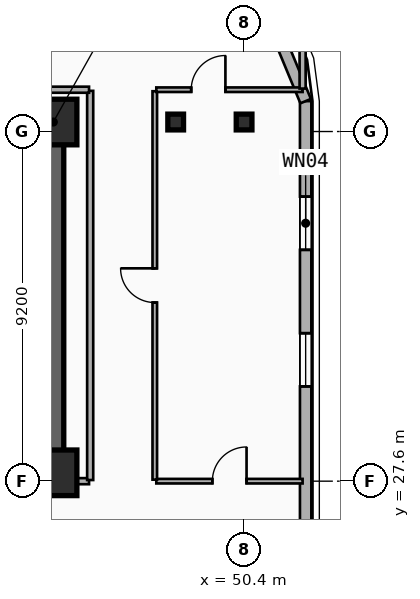
"""IFC4 building model, lengths in metres.
Left out: names, types, materials, properties, quantities, classifications, styles, units other than length and angle.
Written with IfcOpenShell. Run it as: python <this file> out.ifc"""

import sys

from ifc_helpers import new_model, si_unit, direction, frame, frame_2d, origin, origin_2d, place, context, subcontext, project, spatial, rectangle, i_section, extrude, element, fill, save


model = new_model("IFC4")
c1 = context("Model", 3, precision=1e-05, world=origin(), true_north=direction((0.0, 1.0)))
c2 = subcontext(c1, "Body", "Model", "MODEL_VIEW")
j1 = project(units=[si_unit("LENGTHUNIT", "METRE"), si_unit("PLANEANGLEUNIT", "RADIAN")], contexts=[c1])
p1 = place(None, origin())
s1 = spatial("IfcSite", under=j1, at=p1, CompositionType="ELEMENT")
p2 = place(p1, origin())
s2 = spatial("IfcBuilding", under=s1, at=p2, CompositionType="ELEMENT")
p3 = place(p2, frame((0.0, 0.0, 148.35)))
s3 = spatial("IfcBuildingStorey", under=s2, at=p3, CompositionType="ELEMENT", Elevation=148.35)
p4 = place(p3, frame((12.15, 37.05, 0.0), z_axis=(0.0, 0.0, 1.0), x_axis=(1.0, 0.0, 0.0)))
e1 = element("IfcWall", 1, at=p4, inside=s3, PredefinedType="SHEAR", context=c2, shape_type="SweptSolid", body=[
    extrude(rectangle(XDim=33.23, YDim=0.55, at=frame_2d((16.615, 0.0))), origin(), (0.0, 0.0, 1.0), 3.55),
])
p5 = place(p3, frame((45.38, 27.82, 0.0), z_axis=(0.0, 0.0, 1.0), x_axis=(-1.0, 0.0, 0.0)))
e2 = element("IfcWall", 2, at=p5, inside=s3, PredefinedType="SHEAR", context=c2, shape_type="SweptSolid", body=[
    extrude(rectangle(XDim=12.23, YDim=0.55, at=frame_2d((6.115, 0.0))), origin(), (0.0, 0.0, 1.0), 3.55),
])
p6 = place(p5, frame((9.93, 0.0, 0.0)))
e3 = element("IfcOpeningElement", 3, at=p6, cuts=e2, PredefinedType="OPENING", context=c2, shape_type="SweptSolid", body=[
    extrude(rectangle(XDim=1.1, YDim=2.15, at=frame_2d((0.55, 1.075))), frame((0.0, 0.285, 0.0), z_axis=(0.0, -1.0, 0.0), x_axis=(1.0, 0.0, 0.0)), (0.0, 0.0, 1.0), 0.57),
])
p7 = place(p5, frame((6.23, 0.0, 0.0)))
e4 = element("IfcOpeningElement", 4, at=p7, cuts=e2, PredefinedType="OPENING", context=c2, shape_type="SweptSolid", body=[
    extrude(rectangle(XDim=1.1, YDim=2.15, at=frame_2d((0.55, 1.075))), frame((0.0, 0.285, 0.0), z_axis=(0.0, -1.0, 0.0), x_axis=(1.0, 0.0, 0.0)), (0.0, 0.0, 1.0), 0.57),
])
p8 = place(p3, frame((45.38, 28.095, 0.0), z_axis=(0.0, 0.0, 1.0), x_axis=(0.0, 1.0, 0.0)))
e5 = element("IfcWall", 5, at=p8, inside=s3, PredefinedType="SHEAR", context=c2, shape_type="SweptSolid", body=[
    extrude(rectangle(XDim=8.68, YDim=0.55, at=frame_2d((4.34, 0.0))), origin(), (0.0, 0.0, 1.0), 3.55),
])
for number, where, z_axis, x_axis in (
    (6, (45.4, 27.82, 0.0), (0.0, 0.0, 1.0), (1.0, 0.0, 0.0)),
    (7, (45.4, 37.05, 0.0), (0.0, 0.0, 1.0), (1.0, 0.0, 0.0)),
):
    element("IfcColumn", number, at=place(p3, frame(where, z_axis=z_axis, x_axis=x_axis)), inside=s3, PredefinedType="COLUMN", context=c2, shape_type="SweptSolid", body=[
        extrude(rectangle(XDim=1.2, YDim=1.2, at=origin_2d()), origin(), (0.0, 0.0, 1.0), 3.55),
    ])
for number, where, z_axis, x_axis in (
    (8, (48.6, 37.05, 0.0), (0.0, 0.0, 1.0), (1.0, 0.0, 0.0)),
    (9, (50.4, 37.05, 0.0), (0.0, 0.0, 1.0), (1.0, 0.0, 0.0)),
):
    element("IfcColumn", number, at=place(p3, frame(where, z_axis=z_axis, x_axis=x_axis)), inside=s3, PredefinedType="COLUMN", context=c2, shape_type="SweptSolid", body=[
        extrude(i_section(OverallWidth=0.413, OverallDepth=0.415, WebThickness=0.03, FlangeThickness=0.047, FilletRadius=0.015, at=origin_2d()), origin(), (0.0, 0.0, 1.0), 3.55),
    ])
p9 = place(p3, frame((52.02, 37.6, 0.0), z_axis=(0.0, 0.0, 1.0), x_axis=(0.0, -1.0, 0.0)))
e10 = element("IfcWall", 10, at=p9, inside=s3, PredefinedType="SOLIDWALL", context=c2, shape_type="SweptSolid", body=[
    extrude(rectangle(XDim=23.0, YDim=0.3, at=frame_2d((11.5, 0.0))), origin(), (0.0, 0.0, 1.0), 3.29),
])
p10 = place(p9, frame((2.513, 0.0, 0.34)))
e11 = element("IfcOpeningElement", 11, at=p10, cuts=e10, PredefinedType="OPENING", context=c2, shape_type="SweptSolid", body=[
    extrude(rectangle(XDim=1.4, YDim=2.1, at=frame_2d((0.7, 1.05))), frame((0.0, 0.16, 0.0), z_axis=(0.0, -1.0, 0.0), x_axis=(1.0, 0.0, 0.0)), (0.0, 0.0, 1.0), 0.32),
])
p11 = place(p9, frame((6.107, 0.0, 0.34)))
e12 = element("IfcOpeningElement", 12, at=p11, cuts=e10, PredefinedType="OPENING", context=c2, shape_type="SweptSolid", body=[
    extrude(rectangle(XDim=1.4, YDim=2.1, at=frame_2d((0.7, 1.05))), frame((0.0, 0.16, 0.0), z_axis=(0.0, -1.0, 0.0), x_axis=(1.0, 0.0, 0.0)), (0.0, 0.0, 1.0), 0.32),
])
p12 = place(p9, frame((14.86, 0.0, 0.34)))
e13 = element("IfcOpeningElement", 13, at=p12, cuts=e10, PredefinedType="OPENING", context=c2, shape_type="SweptSolid", body=[
    extrude(rectangle(XDim=1.4, YDim=2.1, at=frame_2d((0.7, 1.05))), frame((0.0, 0.16, 0.0), z_axis=(0.0, -1.0, 0.0), x_axis=(1.0, 0.0, 0.0)), (0.0, 0.0, 1.0), 0.32),
])
p13 = place(p9, frame((18.77, 0.0, 0.34)))
e14 = element("IfcOpeningElement", 14, at=p13, cuts=e10, PredefinedType="OPENING", context=c2, shape_type="SweptSolid", body=[
    extrude(rectangle(XDim=1.4, YDim=2.1, at=frame_2d((0.7, 1.05))), frame((0.0, 0.16, 0.0), z_axis=(0.0, -1.0, 0.0), x_axis=(1.0, 0.0, 0.0)), (0.0, 0.0, 1.0), 0.32),
])
p14 = place(p3, frame((50.843, 40.443, 0.0), z_axis=(0.0, 0.0, 1.0), x_axis=(0.382704529509, -0.923870793506, 0.0)))
e15 = element("IfcWall", 15, at=p14, inside=s3, PredefinedType="SOLIDWALL", context=c2, shape_type="SweptSolid", body=[
    extrude(rectangle(XDim=3.077, YDim=0.3, at=frame_2d((1.538, 0.0))), origin(), (0.0, 0.0, 1.0), 3.29),
])
p15 = place(p3, frame((48.09, 27.6, 0.0), z_axis=(0.0, 0.0, 1.0), x_axis=(1.0, 0.0, 0.0)))
e16 = element("IfcWall", 16, at=p15, inside=s3, PredefinedType="PARTITIONING", context=c2, shape_type="SweptSolid", body=[
    extrude(rectangle(XDim=3.85, YDim=0.12, at=frame_2d((1.925, 0.0))), origin(), (0.0, 0.0, 1.0), 2.62),
])
p16 = place(p15, frame((1.475, 0.0, 0.0)))
e17 = element("IfcOpeningElement", 17, at=p16, cuts=e16, PredefinedType="OPENING", context=c2, shape_type="SweptSolid", body=[
    extrude(rectangle(XDim=0.9, YDim=2.1, at=frame_2d((0.45, 1.05))), frame((0.0, 0.07, 0.0), z_axis=(0.0, -1.0, 0.0), x_axis=(1.0, 0.0, 0.0)), (0.0, 0.0, 1.0), 0.14),
])
p17 = place(p3, frame((48.05, 27.64, 0.0), z_axis=(0.0, 0.0, 1.0), x_axis=(0.0, 1.0, 0.0)))
e18 = element("IfcWall", 18, at=p17, inside=s3, PredefinedType="PARTITIONING", context=c2, shape_type="SweptSolid", body=[
    extrude(rectangle(XDim=10.22, YDim=0.12, at=frame_2d((5.11, 0.0))), origin(), (0.0, 0.0, 1.0), 2.77),
])
p18 = place(p17, frame((4.66, 0.0, 0.0)))
e19 = element("IfcOpeningElement", 19, at=p18, cuts=e18, PredefinedType="OPENING", context=c2, shape_type="SweptSolid", body=[
    extrude(rectangle(XDim=0.9, YDim=2.1, at=frame_2d((0.45, 1.05))), frame((0.0, 0.07, 0.0), z_axis=(0.0, -1.0, 0.0), x_axis=(1.0, 0.0, 0.0)), (0.0, 0.0, 1.0), 0.14),
])
p19 = place(p3, frame((48.09, 37.9, 0.0), z_axis=(0.0, 0.0, 1.0), x_axis=(1.0, 0.0, 0.0)))
e20 = element("IfcWall", 20, at=p19, inside=s3, PredefinedType="PARTITIONING", context=c2, shape_type="SweptSolid", body=[
    extrude(rectangle(XDim=3.85, YDim=0.12, at=frame_2d((1.925, 0.0))), origin(), (0.0, 0.0, 1.0), 3.29),
])
p20 = place(p19, frame((0.919, 0.0, 0.0)))
e21 = element("IfcOpeningElement", 21, at=p20, cuts=e20, PredefinedType="OPENING", context=c2, shape_type="SweptSolid", body=[
    extrude(rectangle(XDim=0.9, YDim=2.1, at=frame_2d((0.45, 1.05))), frame((0.0, 0.07, 0.0), z_axis=(0.0, -1.0, 0.0), x_axis=(1.0, 0.0, 0.0)), (0.0, 0.0, 1.0), 0.14),
])
p21 = place(p3, frame((45.41, 27.6, 0.0), z_axis=(0.0, 0.0, 1.0), x_axis=(1.0, 0.0, 0.0)))
e22 = element("IfcWall", 22, at=p21, inside=s3, PredefinedType="PARTITIONING", context=c2, shape_type="SweptSolid", body=[
    extrude(rectangle(XDim=0.91, YDim=0.16, at=frame_2d((0.455, 0.0))), origin(), (0.0, 0.0, 1.0), 2.36),
])
p22 = place(p3, frame((46.35, 27.63, 0.0), z_axis=(0.0, 0.0, 1.0), x_axis=(0.0, 1.0, 0.0)))
e23 = element("IfcWall", 23, at=p22, inside=s3, PredefinedType="PARTITIONING", context=c2, shape_type="SweptSolid", body=[
    extrude(rectangle(XDim=10.24, YDim=0.16, at=frame_2d((5.12, 0.0))), origin(), (0.0, 0.0, 1.0), 2.77),
])
p23 = place(p3, frame((11.28, 37.9, 0.0), z_axis=(0.0, 0.0, 1.0), x_axis=(1.0, 0.0, 0.0)))
e24 = element("IfcWall", 24, at=p23, inside=s3, PredefinedType="PARTITIONING", context=c2, shape_type="SweptSolid", body=[
    extrude(rectangle(XDim=35.04, YDim=0.16, at=frame_2d((17.52, 0.0))), origin(), (0.0, 0.0, 1.0), 3.29),
])
p24 = place(p3, frame((51.94, 37.93, 0.0), z_axis=(0.0, 0.0, 1.0), x_axis=(0.0, 1.0, 0.0)))
e25 = element("IfcWall", 25, at=p24, inside=s3, PredefinedType="PARTITIONING", context=c2, shape_type="SweptSolid", body=[
    extrude(rectangle(XDim=1.44, YDim=0.16, at=frame_2d((0.72, 0.0))), origin(), (0.0, 0.0, 1.0), 3.29),
])
p25 = place(p10, origin())
e26 = element("IfcWindow", 26, at=p25, inside=s3, PartitioningType="SINGLE_PANEL", PredefinedType="WINDOW", context=c2, shape_type="SweptSolid", body=[
    extrude(rectangle(XDim=1.4, YDim=2.1, at=frame_2d((0.7, 1.05))), frame((0.0, 0.03, 0.0), z_axis=(0.0, -1.0, 0.0), x_axis=(1.0, 0.0, 0.0)), (0.0, 0.0, 1.0), 0.06),
])
fill(e11, e26)
p26 = place(p11, origin())
e27 = element("IfcWindow", 27, at=p26, inside=s3, PartitioningType="SINGLE_PANEL", PredefinedType="WINDOW", context=c2, shape_type="SweptSolid", body=[
    extrude(rectangle(XDim=1.4, YDim=2.1, at=frame_2d((0.7, 1.05))), frame((0.0, 0.03, 0.0), z_axis=(0.0, -1.0, 0.0), x_axis=(1.0, 0.0, 0.0)), (0.0, 0.0, 1.0), 0.06),
])
fill(e12, e27)
p27 = place(p16, origin())
e28 = element("IfcDoor", 28, at=p27, inside=s3, OperationType="SINGLE_SWING_RIGHT", PredefinedType="DOOR", context=c2, shape_type="SweptSolid", body=[
    extrude(rectangle(XDim=0.9, YDim=2.1, at=frame_2d((0.45, 1.05))), frame((0.0, 0.025, 0.0), z_axis=(0.0, -1.0, 0.0), x_axis=(1.0, 0.0, 0.0)), (0.0, 0.0, 1.0), 0.05),
])
fill(e17, e28)
p28 = place(p18, origin())
e29 = element("IfcDoor", 29, at=p28, inside=s3, OperationType="SINGLE_SWING_RIGHT", PredefinedType="DOOR", context=c2, shape_type="SweptSolid", body=[
    extrude(rectangle(XDim=0.9, YDim=2.1, at=frame_2d((0.45, 1.05))), frame((0.0, 0.025, 0.0), z_axis=(0.0, -1.0, 0.0), x_axis=(1.0, 0.0, 0.0)), (0.0, 0.0, 1.0), 0.05),
])
fill(e19, e29)
p29 = place(p20, origin())
e30 = element("IfcDoor", 30, at=p29, inside=s3, OperationType="SINGLE_SWING_RIGHT", PredefinedType="DOOR", context=c2, shape_type="SweptSolid", body=[
    extrude(rectangle(XDim=0.9, YDim=2.1, at=frame_2d((0.45, 1.05))), frame((0.0, 0.025, 0.0), z_axis=(0.0, -1.0, 0.0), x_axis=(1.0, 0.0, 0.0)), (0.0, 0.0, 1.0), 0.05),
])
fill(e21, e30)
save(model, sys.argv[1])
